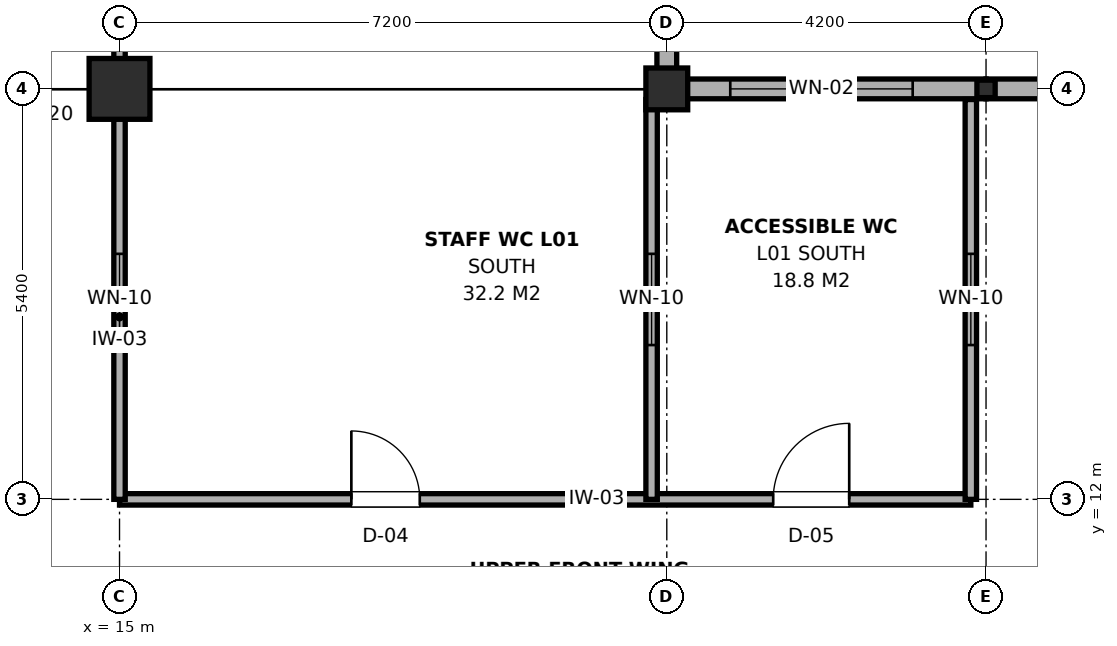
"""IFC4 building model, lengths in metres.
Left out: names, types, materials, properties, quantities, classifications, styles, units other than length and angle.
Written with IfcOpenShell. Run it as: python <this file> out.ifc"""

import sys

from ifc_helpers import new_model, si_unit, direction, frame, frame_2d, origin, origin_2d, place, context, subcontext, project, spatial, rectangle, i_section, extrude, element, fill, save


model = new_model("IFC4")
c1 = context("Model", 3, precision=1e-05, world=origin(), true_north=direction((0.0, 1.0)))
c2 = subcontext(c1, "Body", "Model", "MODEL_VIEW")
j1 = project(units=[si_unit("LENGTHUNIT", "METRE"), si_unit("PLANEANGLEUNIT", "RADIAN")], contexts=[c1])
p1 = place(None, origin())
s1 = spatial("IfcSite", under=j1, at=p1, CompositionType="ELEMENT")
p2 = place(p1, origin())
s2 = spatial("IfcBuilding", under=s1, at=p2, CompositionType="ELEMENT")
p3 = place(p2, frame((0.0, 0.0, 4.8)))
s3 = spatial("IfcBuildingStorey", under=s2, at=p3, CompositionType="ELEMENT", Elevation=4.8)
p4 = place(p3, frame((15.0, 17.4, 0.0), z_axis=(0.0, 0.0, 1.0), x_axis=(1.0, 0.0, 0.0)))
e1 = element("IfcColumn", 1, at=p4, inside=s3, PredefinedType="COLUMN", context=c2, shape_type="SweptSolid", body=[
    extrude(rectangle(XDim=0.8, YDim=0.8, at=origin_2d()), origin(), (0.0, 0.0, 1.0), 4.2),
])
p5 = place(p3, frame((22.2, 17.4, 0.0), z_axis=(0.0, 0.0, 1.0), x_axis=(1.0, 0.0, 0.0)))
e2 = element("IfcColumn", 2, at=p5, inside=s3, PredefinedType="COLUMN", context=c2, shape_type="SweptSolid", body=[
    extrude(rectangle(XDim=0.55, YDim=0.55, at=origin_2d()), origin(), (0.0, 0.0, 1.0), 4.2),
])
p6 = place(p3, frame((26.4, 17.4, 0.0), z_axis=(0.0, 0.0, 1.0), x_axis=(1.0, 0.0, 0.0)))
e3 = element("IfcColumn", 3, at=p6, inside=s3, PredefinedType="COLUMN", context=c2, shape_type="SweptSolid", body=[
    extrude(i_section(OverallWidth=0.24, OverallDepth=0.23, WebThickness=0.008, FlangeThickness=0.012, FilletRadius=0.021, at=origin_2d()), origin(), (0.0, 0.0, 1.0), 3.98),
])
p7 = place(p3, frame((22.07, 17.4, 0.0), z_axis=(0.0, 0.0, 1.0), x_axis=(1.0, 0.0, 0.0)))
e4 = element("IfcWall", 4, at=p7, inside=s3, PredefinedType="SOLIDWALL", context=c2, shape_type="SweptSolid", body=[
    extrude(rectangle(XDim=4.33, YDim=0.26, at=frame_2d((2.165, 0.0))), origin(), (0.0, 0.0, 1.0), 3.375),
])
p8 = place(p7, frame((0.965, 0.0, 0.9)))
e5 = element("IfcOpeningElement", 5, at=p8, cuts=e4, PredefinedType="OPENING", context=c2, shape_type="SweptSolid", body=[
    extrude(rectangle(XDim=2.4, YDim=2.1, at=frame_2d((1.2, 1.05))), frame((0.0, 0.145, 0.0), z_axis=(0.0, -1.0, 0.0), x_axis=(1.0, 0.0, 0.0)), (0.0, 0.0, 1.0), 0.29),
])
p9 = place(p3, frame((26.4, 17.4, 0.0), z_axis=(0.0, 0.0, 1.0), x_axis=(1.0, 0.0, 0.0)))
e6 = element("IfcWall", 6, at=p9, inside=s3, PredefinedType="SOLIDWALL", context=c2, shape_type="SweptSolid", body=[
    extrude(rectangle(XDim=7.8, YDim=0.26, at=frame_2d((3.9, 0.0))), origin(), (0.0, 0.0, 1.0), 3.425),
])
p10 = place(p9, frame((1.184, 0.0, 0.9)))
e7 = element("IfcOpeningElement", 7, at=p10, cuts=e6, PredefinedType="OPENING", context=c2, shape_type="SweptSolid", body=[
    extrude(rectangle(XDim=2.0, YDim=1.8, at=frame_2d((1.0, 0.9))), frame((0.0, 0.145, 0.0), z_axis=(0.0, -1.0, 0.0), x_axis=(1.0, 0.0, 0.0)), (0.0, 0.0, 1.0), 0.29),
])
p11 = place(p9, frame((4.616, 0.0, 0.9)))
e8 = element("IfcOpeningElement", 8, at=p11, cuts=e6, PredefinedType="OPENING", context=c2, shape_type="SweptSolid", body=[
    extrude(rectangle(XDim=2.0, YDim=1.8, at=frame_2d((1.0, 0.9))), frame((0.0, 0.145, 0.0), z_axis=(0.0, -1.0, 0.0), x_axis=(1.0, 0.0, 0.0)), (0.0, 0.0, 1.0), 0.29),
])
p12 = place(p3, frame((22.2, 17.27, 0.0), z_axis=(0.0, 0.0, 1.0), x_axis=(0.0, 1.0, 0.0)))
e9 = element("IfcWall", 9, at=p12, inside=s3, PredefinedType="SOLIDWALL", context=c2, shape_type="SweptSolid", body=[
    extrude(rectangle(XDim=7.93, YDim=0.26, at=frame_2d((3.965, 0.0))), origin(), (0.0, 0.0, 1.0), 3.375),
])
p13 = place(p12, frame((1.22, 0.0, 0.9)))
e10 = element("IfcOpeningElement", 10, at=p13, cuts=e9, PredefinedType="OPENING", context=c2, shape_type="SweptSolid", body=[
    extrude(rectangle(XDim=2.0, YDim=1.8, at=frame_2d((1.0, 0.9))), frame((0.0, 0.145, 0.0), z_axis=(0.0, -1.0, 0.0), x_axis=(1.0, 0.0, 0.0)), (0.0, 0.0, 1.0), 0.29),
])
p14 = place(p12, frame((4.71, 0.0, 0.9)))
e11 = element("IfcOpeningElement", 11, at=p14, cuts=e9, PredefinedType="OPENING", context=c2, shape_type="SweptSolid", body=[
    extrude(rectangle(XDim=2.0, YDim=1.8, at=frame_2d((1.0, 0.9))), frame((0.0, 0.145, 0.0), z_axis=(0.0, -1.0, 0.0), x_axis=(1.0, 0.0, 0.0)), (0.0, 0.0, 1.0), 0.29),
])
p15 = place(p3, frame((15.0, 12.0, 0.0), z_axis=(0.0, 0.0, 1.0), x_axis=(1.0, 0.0, 0.0)))
e12 = element("IfcWall", 12, at=p15, inside=s3, PredefinedType="PARTITIONING", context=c2, shape_type="SweptSolid", body=[
    extrude(rectangle(XDim=11.2, YDim=0.15, at=frame_2d((5.6, 0.0))), origin(), (0.0, 0.0, 1.0), 3.475),
])
p16 = place(p15, frame((3.05, 0.0, 0.0)))
e13 = element("IfcOpeningElement", 13, at=p16, cuts=e12, PredefinedType="OPENING", context=c2, shape_type="SweptSolid", body=[
    extrude(rectangle(XDim=0.9, YDim=2.15, at=frame_2d((0.45, 1.075))), frame((0.0, 0.09, 0.0), z_axis=(0.0, -1.0, 0.0), x_axis=(1.0, 0.0, 0.0)), (0.0, 0.0, 1.0), 0.18),
])
p17 = place(p15, frame((8.6, 0.0, 0.0)))
e14 = element("IfcOpeningElement", 14, at=p17, cuts=e12, PredefinedType="OPENING", context=c2, shape_type="SweptSolid", body=[
    extrude(rectangle(XDim=1.0, YDim=2.15, at=frame_2d((0.5, 1.075))), frame((0.0, 0.09, 0.0), z_axis=(0.0, -1.0, 0.0), x_axis=(1.0, 0.0, 0.0)), (0.0, 0.0, 1.0), 0.18),
])
p18 = place(p3, frame((15.0, 12.0, 0.0), z_axis=(0.0, 0.0, 1.0), x_axis=(0.0, 1.0, 0.0)))
e15 = element("IfcWall", 15, at=p18, inside=s3, PredefinedType="PARTITIONING", context=c2, shape_type="SweptSolid", body=[
    extrude(rectangle(XDim=5.26, YDim=0.15, at=frame_2d((2.63, 0.0))), origin(), (0.0, 0.0, 1.0), 3.475),
])
p19 = place(p18, frame((2.03, 0.0, 0.95)))
e16 = element("IfcOpeningElement", 16, at=p19, cuts=e15, PredefinedType="OPENING", context=c2, shape_type="SweptSolid", body=[
    extrude(rectangle(XDim=1.2, YDim=1.5, at=frame_2d((0.6, 0.75))), frame((0.0, 0.09, 0.0), z_axis=(0.0, -1.0, 0.0), x_axis=(1.0, 0.0, 0.0)), (0.0, 0.0, 1.0), 0.18),
])
p20 = place(p3, frame((22.0, 12.0, 0.0), z_axis=(0.0, 0.0, 1.0), x_axis=(0.0, 1.0, 0.0)))
e17 = element("IfcWall", 17, at=p20, inside=s3, PredefinedType="PARTITIONING", context=c2, shape_type="SweptSolid", body=[
    extrude(rectangle(XDim=5.26, YDim=0.15, at=frame_2d((2.63, 0.0))), origin(), (0.0, 0.0, 1.0), 3.375),
])
p21 = place(p20, frame((2.03, 0.0, 0.95)))
e18 = element("IfcOpeningElement", 18, at=p21, cuts=e17, PredefinedType="OPENING", context=c2, shape_type="SweptSolid", body=[
    extrude(rectangle(XDim=1.2, YDim=1.5, at=frame_2d((0.6, 0.75))), frame((0.0, 0.09, 0.0), z_axis=(0.0, -1.0, 0.0), x_axis=(1.0, 0.0, 0.0)), (0.0, 0.0, 1.0), 0.18),
])
p22 = place(p3, frame((26.2, 12.0, 0.0), z_axis=(0.0, 0.0, 1.0), x_axis=(0.0, 1.0, 0.0)))
e19 = element("IfcWall", 19, at=p22, inside=s3, PredefinedType="PARTITIONING", context=c2, shape_type="SweptSolid", body=[
    extrude(rectangle(XDim=5.26, YDim=0.15, at=frame_2d((2.63, 0.0))), origin(), (0.0, 0.0, 1.0), 3.425),
])
p23 = place(p22, frame((2.03, 0.0, 0.95)))
e20 = element("IfcOpeningElement", 20, at=p23, cuts=e19, PredefinedType="OPENING", context=c2, shape_type="SweptSolid", body=[
    extrude(rectangle(XDim=1.2, YDim=1.5, at=frame_2d((0.6, 0.75))), frame((0.0, 0.09, 0.0), z_axis=(0.0, -1.0, 0.0), x_axis=(1.0, 0.0, 0.0)), (0.0, 0.0, 1.0), 0.18),
])
p24 = place(p3, frame((15.0, 17.56, 0.0), z_axis=(0.0, 0.0, 1.0), x_axis=(0.0, 1.0, 0.0)))
e21 = element("IfcWall", 21, at=p24, inside=s3, PredefinedType="PARTITIONING", context=c2, shape_type="SweptSolid", body=[
    extrude(rectangle(XDim=8.24, YDim=0.15, at=frame_2d((4.12, 0.0))), origin(), (0.0, 0.0, 1.0), 3.375),
])
p25 = place(p24, frame((3.595, 0.0, 0.0)))
e22 = element("IfcOpeningElement", 22, at=p25, cuts=e21, PredefinedType="OPENING", context=c2, shape_type="SweptSolid", body=[
    extrude(rectangle(XDim=1.05, YDim=2.15, at=frame_2d((0.525, 1.075))), frame((0.0, 0.09, 0.0), z_axis=(0.0, -1.0, 0.0), x_axis=(1.0, 0.0, 0.0)), (0.0, 0.0, 1.0), 0.18),
])
p26 = place(p8, origin())
e23 = element("IfcWindow", 23, at=p26, inside=s3, PartitioningType="SINGLE_PANEL", PredefinedType="WINDOW", context=c2, shape_type="SweptSolid", body=[
    extrude(rectangle(XDim=2.4, YDim=2.1, at=frame_2d((1.2, 1.05))), frame((0.0, 0.03, 0.0), z_axis=(0.0, -1.0, 0.0), x_axis=(1.0, 0.0, 0.0)), (0.0, 0.0, 1.0), 0.06),
])
fill(e5, e23)
p27 = place(p16, origin())
e24 = element("IfcDoor", 24, at=p27, inside=s3, OperationType="SINGLE_SWING_LEFT", PredefinedType="DOOR", context=c2, shape_type="SweptSolid", body=[
    extrude(rectangle(XDim=0.9, YDim=2.15, at=frame_2d((0.45, 1.075))), frame((0.0, 0.025, 0.0), z_axis=(0.0, -1.0, 0.0), x_axis=(1.0, 0.0, 0.0)), (0.0, 0.0, 1.0), 0.05),
])
fill(e13, e24)
p28 = place(p17, origin())
e25 = element("IfcDoor", 25, at=p28, inside=s3, OperationType="SINGLE_SWING_RIGHT", PredefinedType="DOOR", context=c2, shape_type="SweptSolid", body=[
    extrude(rectangle(XDim=1.0, YDim=2.15, at=frame_2d((0.5, 1.075))), frame((0.0, 0.025, 0.0), z_axis=(0.0, -1.0, 0.0), x_axis=(1.0, 0.0, 0.0)), (0.0, 0.0, 1.0), 0.05),
])
fill(e14, e25)
p29 = place(p19, origin())
e26 = element("IfcWindow", 26, at=p29, inside=s3, PartitioningType="SINGLE_PANEL", PredefinedType="WINDOW", context=c2, shape_type="SweptSolid", body=[
    extrude(rectangle(XDim=1.2, YDim=1.5, at=frame_2d((0.6, 0.75))), frame((0.0, 0.03, 0.0), z_axis=(0.0, -1.0, 0.0), x_axis=(1.0, 0.0, 0.0)), (0.0, 0.0, 1.0), 0.06),
])
fill(e16, e26)
p30 = place(p21, origin())
e27 = element("IfcWindow", 27, at=p30, inside=s3, PartitioningType="SINGLE_PANEL", PredefinedType="WINDOW", context=c2, shape_type="SweptSolid", body=[
    extrude(rectangle(XDim=1.2, YDim=1.5, at=frame_2d((0.6, 0.75))), frame((0.0, 0.03, 0.0), z_axis=(0.0, -1.0, 0.0), x_axis=(1.0, 0.0, 0.0)), (0.0, 0.0, 1.0), 0.06),
])
fill(e18, e27)
p31 = place(p23, origin())
e28 = element("IfcWindow", 28, at=p31, inside=s3, PartitioningType="SINGLE_PANEL", PredefinedType="WINDOW", context=c2, shape_type="SweptSolid", body=[
    extrude(rectangle(XDim=1.2, YDim=1.5, at=frame_2d((0.6, 0.75))), frame((0.0, 0.03, 0.0), z_axis=(0.0, -1.0, 0.0), x_axis=(1.0, 0.0, 0.0)), (0.0, 0.0, 1.0), 0.06),
])
fill(e20, e28)
save(model, sys.argv[1])
